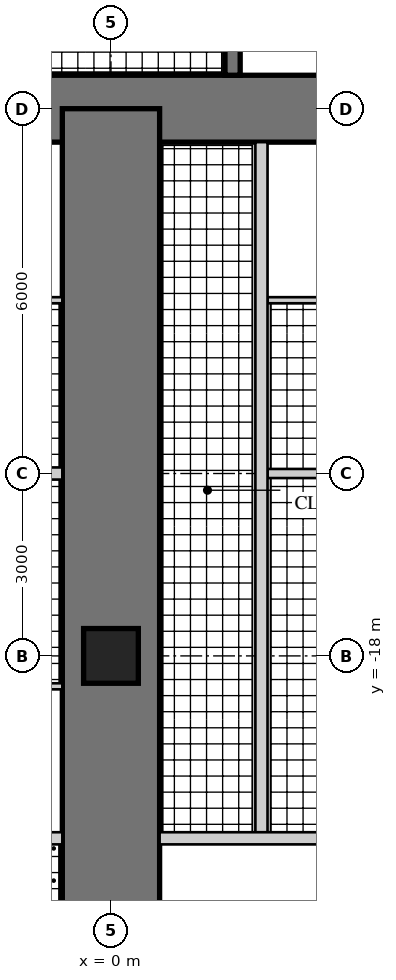
"""IFC4 building model, lengths in metres.
Left out: names, types, materials, properties, quantities, classifications, styles, units other than length and angle.
Written with IfcOpenShell. Run it as: python <this file> out.ifc"""

import sys

from ifc_helpers import new_model, si_unit, direction, frame, frame_2d, origin, origin_2d, place, context, subcontext, project, spatial, rectangle, extrude, element, fill, save


model = new_model("IFC4")
c1 = context("Model", 3, precision=1e-05, world=origin(), true_north=direction((0.0, 1.0)))
c2 = subcontext(c1, "Body", "Model", "MODEL_VIEW")
j1 = project(units=[si_unit("LENGTHUNIT", "METRE"), si_unit("PLANEANGLEUNIT", "RADIAN")], contexts=[c1])
p1 = place(None, origin())
s1 = spatial("IfcSite", under=j1, at=p1, CompositionType="ELEMENT")
p2 = place(p1, origin())
s2 = spatial("IfcBuilding", under=s1, at=p2, CompositionType="ELEMENT")
p3 = place(p2, frame((0.0, 0.0, 200.1)))
s3 = spatial("IfcBuildingStorey", under=s2, at=p3, CompositionType="ELEMENT", Elevation=200.1)
p4 = place(p3, frame((-9.0, -9.0, 0.0), z_axis=(0.0, 0.0, 1.0), x_axis=(1.0, 0.0, 0.0)))
e1 = element("IfcWall", 1, at=p4, inside=s3, PredefinedType="SHEAR", context=c2, shape_type="SweptSolid", body=[
    extrude(rectangle(XDim=18.0, YDim=1.1, at=frame_2d((9.0, 0.0))), origin(), (0.0, 0.0, 1.0), 3.4),
])
p5 = place(p4, frame((9.8, 0.0, 0.0)))
e2 = element("IfcOpeningElement", 2, at=p5, cuts=e1, PredefinedType="OPENING", context=c2, shape_type="SweptSolid", body=[
    extrude(rectangle(XDim=1.0, YDim=2.4, at=frame_2d((0.5, 1.2))), frame((0.0, 0.56, 0.0), z_axis=(0.0, -1.0, 0.0), x_axis=(1.0, 0.0, 0.0)), (0.0, 0.0, 1.0), 1.12),
])
p6 = place(p3, frame((2.0, -1.675, 0.0), z_axis=(0.0, 0.0, 1.0), x_axis=(0.0, -1.0, 0.0)))
e3 = element("IfcWall", 3, at=p6, inside=s3, PredefinedType="SHEAR", context=c2, shape_type="SweptSolid", body=[
    extrude(rectangle(XDim=6.775, YDim=0.25, at=frame_2d((3.387, 0.0))), origin(), (0.0, 0.0, 1.0), 3.4),
])
p7 = place(p6, frame((0.725, 0.0, 0.0)))
e4 = element("IfcOpeningElement", 4, at=p7, cuts=e3, PredefinedType="OPENING", context=c2, shape_type="SweptSolid", body=[
    extrude(rectangle(XDim=1.0, YDim=2.1, at=frame_2d((0.5, 1.05))), frame((0.0, 0.135, 0.0), z_axis=(0.0, -1.0, 0.0), x_axis=(1.0, 0.0, 0.0)), (0.0, 0.0, 1.0), 0.27),
])
p8 = place(p3, frame((0.0, -9.0, 0.0), z_axis=(0.0, 0.0, 1.0), x_axis=(0.0, -1.0, 0.0)))
e5 = element("IfcWall", 5, at=p8, inside=s3, PredefinedType="SHEAR", context=c2, shape_type="SweptSolid", body=[
    extrude(rectangle(XDim=18.0, YDim=1.6, at=frame_2d((9.0, 0.0))), origin(), (0.0, 0.0, 1.0), 3.4),
])
p9 = place(p8, frame((3.95, 0.0, 0.0)))
e6 = element("IfcOpeningElement", 6, at=p9, cuts=e5, PredefinedType="OPENING", context=c2, shape_type="SweptSolid", body=[
    extrude(rectangle(XDim=1.0, YDim=2.15, at=frame_2d((0.5, 1.075))), frame((0.0, 0.81, 0.0), z_axis=(0.0, -1.0, 0.0), x_axis=(1.0, 0.0, 0.0)), (0.0, 0.0, 1.0), 1.62),
])
p10 = place(p8, frame((6.6, 0.0, 0.0)))
e7 = element("IfcOpeningElement", 7, at=p10, cuts=e5, PredefinedType="OPENING", context=c2, shape_type="SweptSolid", body=[
    extrude(rectangle(XDim=1.0, YDim=2.15, at=frame_2d((0.5, 1.075))), frame((0.0, 0.81, 0.0), z_axis=(0.0, -1.0, 0.0), x_axis=(1.0, 0.0, 0.0)), (0.0, 0.0, 1.0), 1.62),
])
p11 = place(p8, frame((13.25, 0.0, 0.0)))
e8 = element("IfcOpeningElement", 8, at=p11, cuts=e5, PredefinedType="OPENING", context=c2, shape_type="SweptSolid", body=[
    extrude(rectangle(XDim=1.0, YDim=2.2, at=frame_2d((0.5, 1.1))), frame((0.0, 0.81, 0.0), z_axis=(0.0, -1.0, 0.0), x_axis=(1.0, 0.0, 0.0)), (0.0, 0.0, 1.0), 1.62),
])
p12 = place(p3, frame((0.0, -18.0, 0.0), z_axis=(0.0, 0.0, 1.0), x_axis=(1.0, 0.0, 0.0)))
e9 = element("IfcColumn", 9, at=p12, inside=s3, PredefinedType="COLUMN", context=c2, shape_type="SweptSolid", body=[
    extrude(rectangle(XDim=0.9, YDim=0.9, at=origin_2d()), origin(), (0.0, 0.0, 1.0), 3.4),
])
p13 = place(p3, frame((2.575, -12.15, 0.0), z_axis=(0.0, 0.0, 1.0), x_axis=(1.0, 0.0, 0.0)))
e10 = element("IfcWall", 10, at=p13, inside=s3, PredefinedType="PARTITIONING", context=c2, shape_type="SweptSolid", body=[
    extrude(rectangle(XDim=2.2, YDim=0.1, at=frame_2d((1.1, 0.0))), origin(), (0.0, 0.0, 1.0), 3.22),
])
p14 = place(p13, frame((0.55, 0.0, 0.0)))
e11 = element("IfcOpeningElement", 11, at=p14, cuts=e10, PredefinedType="OPENING", context=c2, shape_type="SweptSolid", body=[
    extrude(rectangle(XDim=0.9, YDim=2.1, at=frame_2d((0.45, 1.05))), frame((0.0, 0.06, 0.0), z_axis=(0.0, -1.0, 0.0), x_axis=(1.0, 0.0, 0.0)), (0.0, 0.0, 1.0), 0.12),
])
p15 = place(p3, frame((2.575, -15.0, 0.0), z_axis=(0.0, 0.0, 1.0), x_axis=(1.0, 0.0, 0.0)))
e12 = element("IfcWall", 12, at=p15, inside=s3, PredefinedType="PARTITIONING", context=c2, shape_type="SweptSolid", body=[
    extrude(rectangle(XDim=5.975, YDim=0.15, at=frame_2d((2.988, 0.0))), origin(), (0.0, 0.0, 1.0), 2.47),
])
p16 = place(p15, frame((0.5, 0.0, 0.0)))
e13 = element("IfcOpeningElement", 13, at=p16, cuts=e12, PredefinedType="OPENING", context=c2, shape_type="SweptSolid", body=[
    extrude(rectangle(XDim=1.0, YDim=2.1, at=frame_2d((0.5, 1.05))), frame((0.0, 0.085, 0.0), z_axis=(0.0, -1.0, 0.0), x_axis=(1.0, 0.0, 0.0)), (0.0, 0.0, 1.0), 0.17),
])
p17 = place(p3, frame((-3.0, -12.15, 0.0), z_axis=(0.0, 0.0, 1.0), x_axis=(1.0, 0.0, 0.0)))
e14 = element("IfcWall", 14, at=p17, inside=s3, PredefinedType="PARTITIONING", context=c2, shape_type="SweptSolid", body=[
    extrude(rectangle(XDim=2.2, YDim=0.1, at=frame_2d((1.1, 0.0))), origin(), (0.0, 0.0, 1.0), 3.22),
])
p18 = place(p17, frame((0.55, 0.0, 0.0)))
e15 = element("IfcOpeningElement", 15, at=p18, cuts=e14, PredefinedType="OPENING", context=c2, shape_type="SweptSolid", body=[
    extrude(rectangle(XDim=0.9, YDim=2.1, at=frame_2d((0.45, 1.05))), frame((0.0, 0.06, 0.0), z_axis=(0.0, -1.0, 0.0), x_axis=(1.0, 0.0, 0.0)), (0.0, 0.0, 1.0), 0.12),
])
p19 = place(p3, frame((-8.55, -15.0, 0.0), z_axis=(0.0, 0.0, 1.0), x_axis=(1.0, 0.0, 0.0)))
e16 = element("IfcWall", 16, at=p19, inside=s3, PredefinedType="SOLIDWALL", context=c2, shape_type="SweptSolid", body=[
    extrude(rectangle(XDim=7.75, YDim=0.2, at=frame_2d((3.875, 0.0))), origin(), (0.0, 0.0, 1.0), 2.47),
])
p20 = place(p3, frame((-3.0, -18.5, 0.0), z_axis=(0.0, 0.0, 1.0), x_axis=(1.0, 0.0, 0.0)))
e17 = element("IfcWall", 17, at=p20, inside=s3, PredefinedType="PARTITIONING", context=c2, shape_type="SweptSolid", body=[
    extrude(rectangle(XDim=2.2, YDim=0.1, at=frame_2d((1.1, 0.0))), origin(), (0.0, 0.0, 1.0), 3.22),
])
p21 = place(p20, frame((0.55, 0.0, 0.0)))
e18 = element("IfcOpeningElement", 18, at=p21, cuts=e17, PredefinedType="OPENING", context=c2, shape_type="SweptSolid", body=[
    extrude(rectangle(XDim=0.9, YDim=2.1, at=frame_2d((0.45, 1.05))), frame((0.0, 0.06, 0.0), z_axis=(0.0, -1.0, 0.0), x_axis=(1.0, 0.0, 0.0)), (0.0, 0.0, 1.0), 0.12),
])
p22 = place(p3, frame((2.475, -9.55, 0.0), z_axis=(0.0, 0.0, 1.0), x_axis=(0.0, -1.0, 0.0)))
e19 = element("IfcWall", 19, at=p22, inside=s3, PredefinedType="SOLIDWALL", context=c2, shape_type="SweptSolid", body=[
    extrude(rectangle(XDim=11.45, YDim=0.2, at=frame_2d((5.725, 0.0))), origin(), (0.0, 0.0, 1.0), 3.22),
])
p23 = place(p22, frame((3.4, 0.0, 0.0)))
e20 = element("IfcOpeningElement", 20, at=p23, cuts=e19, PredefinedType="OPENING", context=c2, shape_type="SweptSolid", body=[
    extrude(rectangle(XDim=1.0, YDim=2.15, at=frame_2d((0.5, 1.075))), frame((0.0, 0.11, 0.0), z_axis=(0.0, -1.0, 0.0), x_axis=(1.0, 0.0, 0.0)), (0.0, 0.0, 1.0), 0.22),
])
p24 = place(p3, frame((-9.0, -21.0, 0.0), z_axis=(0.0, 0.0, 1.0), x_axis=(1.0, 0.0, 0.0)))
e21 = element("IfcWall", 21, at=p24, inside=s3, PredefinedType="SOLIDWALL", context=c2, shape_type="SweptSolid", body=[
    extrude(rectangle(XDim=8.2, YDim=0.2, at=frame_2d((4.1, 0.0))), origin(), (0.0, 0.0, 1.0), 2.62),
])
p25 = place(p3, frame((0.8, -21.0, 0.0), z_axis=(0.0, 0.0, 1.0), x_axis=(1.0, 0.0, 0.0)))
e22 = element("IfcWall", 22, at=p25, inside=s3, PredefinedType="SOLIDWALL", context=c2, shape_type="SweptSolid", body=[
    extrude(rectangle(XDim=8.2, YDim=0.2, at=frame_2d((4.1, 0.0))), origin(), (0.0, 0.0, 1.0), 2.62),
])
p26 = place(p25, frame((0.35, 0.0, 0.0)))
e23 = element("IfcOpeningElement", 23, at=p26, cuts=e22, PredefinedType="OPENING", context=c2, shape_type="SweptSolid", body=[
    extrude(rectangle(XDim=1.0, YDim=2.2, at=frame_2d((0.5, 1.1))), frame((0.0, 0.11, 0.0), z_axis=(0.0, -1.0, 0.0), x_axis=(1.0, 0.0, 0.0)), (0.0, 0.0, 1.0), 0.22),
])
p27 = place(p14, origin())
e24 = element("IfcDoor", 24, at=p27, inside=s3, OperationType="SINGLE_SWING_LEFT", PredefinedType="DOOR", context=c2, shape_type="SweptSolid", body=[
    extrude(rectangle(XDim=0.9, YDim=2.1, at=frame_2d((0.45, 1.05))), frame((0.0, 0.025, 0.0), z_axis=(0.0, -1.0, 0.0), x_axis=(1.0, 0.0, 0.0)), (0.0, 0.0, 1.0), 0.05),
])
fill(e11, e24)
p28 = place(p16, origin())
e25 = element("IfcDoor", 25, at=p28, inside=s3, OperationType="SINGLE_SWING_LEFT", PredefinedType="DOOR", context=c2, shape_type="SweptSolid", body=[
    extrude(rectangle(XDim=1.0, YDim=2.1, at=frame_2d((0.5, 1.05))), frame((0.0, 0.025, 0.0), z_axis=(0.0, -1.0, 0.0), x_axis=(1.0, 0.0, 0.0)), (0.0, 0.0, 1.0), 0.05),
])
fill(e13, e25)
p29 = place(p23, origin())
e26 = element("IfcDoor", 26, at=p29, inside=s3, OperationType="SINGLE_SWING_LEFT", PredefinedType="DOOR", context=c2, shape_type="SweptSolid", body=[
    extrude(rectangle(XDim=1.0, YDim=2.15, at=frame_2d((0.5, 1.075))), frame((0.0, 0.025, 0.0), z_axis=(0.0, -1.0, 0.0), x_axis=(1.0, 0.0, 0.0)), (0.0, 0.0, 1.0), 0.05),
])
fill(e20, e26)
p30 = place(p26, frame((1.0, 0.0, 0.0), z_axis=(0.0, 0.0, 1.0), x_axis=(-1.0, 0.0, 0.0)))
e27 = element("IfcDoor", 27, at=p30, inside=s3, OperationType="SINGLE_SWING_RIGHT", PredefinedType="DOOR", context=c2, shape_type="SweptSolid", body=[
    extrude(rectangle(XDim=1.0, YDim=2.2, at=frame_2d((0.5, 1.1))), frame((0.0, 0.025, 0.0), z_axis=(0.0, -1.0, 0.0), x_axis=(1.0, 0.0, 0.0)), (0.0, 0.0, 1.0), 0.05),
])
fill(e23, e27)
p31 = place(p9, frame((1.0, 0.0, 0.0), z_axis=(0.0, 0.0, 1.0), x_axis=(-1.0, 0.0, 0.0)))
e28 = element("IfcDoor", 28, at=p31, inside=s3, OperationType="SINGLE_SWING_RIGHT", PredefinedType="DOOR", context=c2, shape_type="SweptSolid", body=[
    extrude(rectangle(XDim=1.0, YDim=2.15, at=frame_2d((0.5, 1.075))), frame((0.0, 0.025, 0.0), z_axis=(0.0, -1.0, 0.0), x_axis=(1.0, 0.0, 0.0)), (0.0, 0.0, 1.0), 0.05),
])
fill(e6, e28)
p32 = place(p10, frame((1.0, 0.0, 0.0), z_axis=(0.0, 0.0, 1.0), x_axis=(-1.0, 0.0, 0.0)))
e29 = element("IfcDoor", 29, at=p32, inside=s3, OperationType="SINGLE_SWING_RIGHT", PredefinedType="DOOR", context=c2, shape_type="SweptSolid", body=[
    extrude(rectangle(XDim=1.0, YDim=2.15, at=frame_2d((0.5, 1.075))), frame((0.0, 0.025, 0.0), z_axis=(0.0, -1.0, 0.0), x_axis=(1.0, 0.0, 0.0)), (0.0, 0.0, 1.0), 0.05),
])
fill(e7, e29)
p33 = place(p5, origin())
e30 = element("IfcDoor", 30, at=p33, inside=s3, OperationType="SINGLE_SWING_RIGHT", PredefinedType="DOOR", context=c2, shape_type="SweptSolid", body=[
    extrude(rectangle(XDim=1.0, YDim=2.4, at=frame_2d((0.5, 1.2))), frame((0.0, 0.055, 0.0), z_axis=(0.0, -1.0, 0.0), x_axis=(1.0, 0.0, 0.0)), (0.0, 0.0, 1.0), 0.05),
])
fill(e2, e30)
save(model, sys.argv[1])
